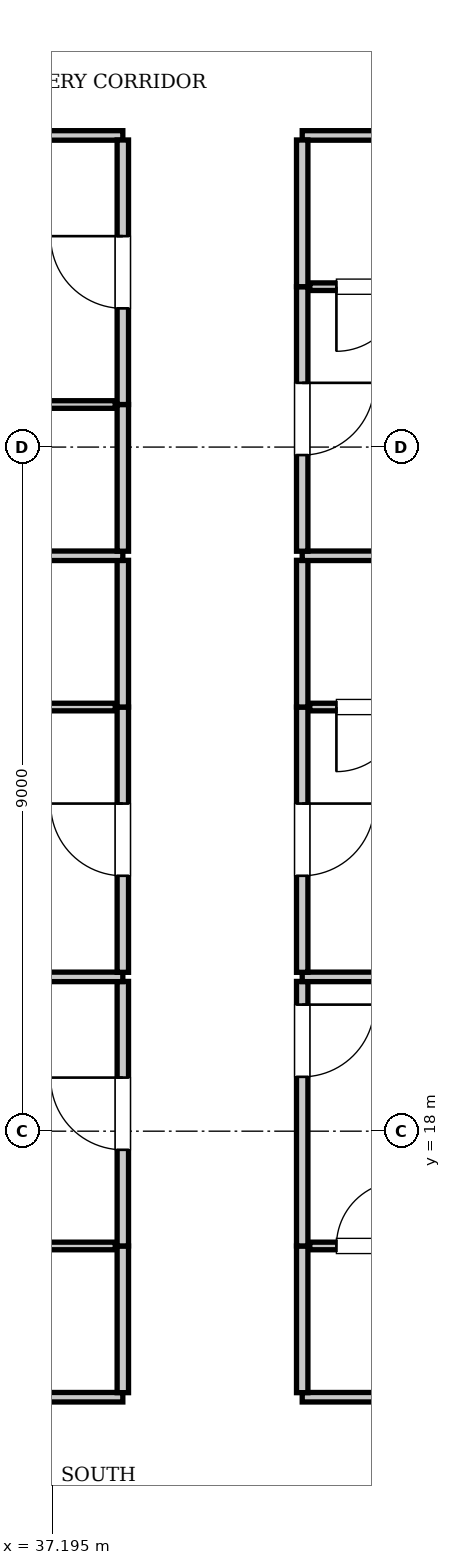
"""IFC4 building model, lengths in metres.
Left out: names, types, materials, properties, quantities, classifications, styles, units other than length and angle.
Written with IfcOpenShell. Run it as: python <this file> out.ifc"""

import sys

from ifc_helpers import new_model, si_unit, direction, frame, frame_2d, origin, place, context, subcontext, project, spatial, rectangle, extrude, element, fill, save


model = new_model("IFC4")
c1 = context("Model", 3, precision=1e-05, world=origin(), true_north=direction((0.0, 1.0)))
c2 = subcontext(c1, "Body", "Model", "MODEL_VIEW")
j1 = project(units=[si_unit("LENGTHUNIT", "METRE"), si_unit("PLANEANGLEUNIT", "RADIAN")], contexts=[c1])
p1 = place(None, origin())
s1 = spatial("IfcSite", under=j1, at=p1, CompositionType="ELEMENT")
p2 = place(p1, origin())
s2 = spatial("IfcBuilding", under=s1, at=p2, CompositionType="ELEMENT")
p3 = place(p2, frame((0.0, 0.0, 158.2)))
s3 = spatial("IfcBuildingStorey", under=s2, at=p3, CompositionType="ELEMENT", Elevation=158.2)
p4 = place(p3, frame((13.2, 14.5, 0.0), z_axis=(0.0, 0.0, 1.0), x_axis=(1.0, 0.0, 0.0)))
e1 = element("IfcWall", 1, at=p4, inside=s3, PredefinedType="PARTITIONING", context=c2, shape_type="SweptSolid", body=[
    extrude(rectangle(XDim=24.92, YDim=0.125, at=frame_2d((12.46, 0.0))), origin(), (0.0, 0.0, 1.0), 3.61),
])
p5 = place(p3, frame((40.48, 14.5, 0.0), z_axis=(0.0, 0.0, 1.0), x_axis=(1.0, 0.0, 0.0)))
e2 = element("IfcWall", 2, at=p5, inside=s3, PredefinedType="PARTITIONING", context=c2, shape_type="SweptSolid", body=[
    extrude(rectangle(XDim=21.92, YDim=0.125, at=frame_2d((10.96, 0.0))), origin(), (0.0, 0.0, 1.0), 3.61),
])
p6 = place(p3, frame((13.2, 31.1, 0.0), z_axis=(0.0, 0.0, 1.0), x_axis=(1.0, 0.0, 0.0)))
e3 = element("IfcWall", 3, at=p6, inside=s3, PredefinedType="PARTITIONING", context=c2, shape_type="SweptSolid", body=[
    extrude(rectangle(XDim=24.92, YDim=0.125, at=frame_2d((12.46, 0.0))), origin(), (0.0, 0.0, 1.0), 3.61),
])
p7 = place(p3, frame((40.48, 31.1, 0.0), z_axis=(0.0, 0.0, 1.0), x_axis=(1.0, 0.0, 0.0)))
e4 = element("IfcWall", 4, at=p7, inside=s3, PredefinedType="PARTITIONING", context=c2, shape_type="SweptSolid", body=[
    extrude(rectangle(XDim=21.92, YDim=0.125, at=frame_2d((10.96, 0.0))), origin(), (0.0, 0.0, 1.0), 3.61),
])
p8 = place(p3, frame((38.12, 14.56, 0.0), z_axis=(0.0, 0.0, 1.0), x_axis=(0.0, 1.0, 0.0)))
e5 = element("IfcWall", 5, at=p8, inside=s3, PredefinedType="PARTITIONING", context=c2, shape_type="SweptSolid", body=[
    extrude(rectangle(XDim=1.93, YDim=0.15, at=frame_2d((0.965, 0.0))), origin(), (0.0, 0.0, 1.0), 3.61),
])
p9 = place(p3, frame((38.12, 16.49, 0.0), z_axis=(0.0, 0.0, 1.0), x_axis=(0.0, 1.0, 0.0)))
e6 = element("IfcWall", 6, at=p9, inside=s3, PredefinedType="PARTITIONING", context=c2, shape_type="SweptSolid", body=[
    extrude(rectangle(XDim=3.48, YDim=0.15, at=frame_2d((1.74, 0.0))), origin(), (0.0, 0.0, 1.0), 3.61),
])
p10 = place(p9, frame((1.265, 0.0, 0.0)))
e7 = element("IfcOpeningElement", 7, at=p10, cuts=e6, PredefinedType="OPENING", context=c2, shape_type="SweptSolid", body=[
    extrude(rectangle(XDim=0.95, YDim=2.15, at=frame_2d((0.475, 1.075))), frame((0.0, 0.085, 0.0), z_axis=(0.0, -1.0, 0.0), x_axis=(1.0, 0.0, 0.0)), (0.0, 0.0, 1.0), 0.17),
])
p11 = place(p3, frame((35.72, 16.49, 0.0), z_axis=(0.0, 0.0, 1.0), x_axis=(1.0, 0.0, 0.0)))
e8 = element("IfcWall", 8, at=p11, inside=s3, PredefinedType="PARTITIONING", context=c2, shape_type="SweptSolid", body=[
    extrude(rectangle(XDim=2.3, YDim=0.1, at=frame_2d((1.15, 0.0))), origin(), (0.0, 0.0, 1.0), 3.61),
])
p12 = place(p11, frame((0.35, 0.0, 0.0)))
e9 = element("IfcOpeningElement", 9, at=p12, cuts=e8, PredefinedType="OPENING", context=c2, shape_type="SweptSolid", body=[
    extrude(rectangle(XDim=0.85, YDim=2.1, at=frame_2d((0.425, 1.05))), frame((0.0, 0.06, 0.0), z_axis=(0.0, -1.0, 0.0), x_axis=(1.0, 0.0, 0.0)), (0.0, 0.0, 1.0), 0.12),
])
p13 = place(p3, frame((40.48, 14.56, 0.0), z_axis=(0.0, 0.0, 1.0), x_axis=(0.0, 1.0, 0.0)))
e10 = element("IfcWall", 10, at=p13, inside=s3, PredefinedType="PARTITIONING", context=c2, shape_type="SweptSolid", body=[
    extrude(rectangle(XDim=1.93, YDim=0.15, at=frame_2d((0.965, 0.0))), origin(), (0.0, 0.0, 1.0), 3.61),
])
p14 = place(p3, frame((40.48, 16.49, 0.0), z_axis=(0.0, 0.0, 1.0), x_axis=(0.0, 1.0, 0.0)))
e11 = element("IfcWall", 11, at=p14, inside=s3, PredefinedType="PARTITIONING", context=c2, shape_type="SweptSolid", body=[
    extrude(rectangle(XDim=3.48, YDim=0.15, at=frame_2d((1.74, 0.0))), origin(), (0.0, 0.0, 1.0), 3.61),
])
p15 = place(p14, frame((2.225, 0.0, 0.0)))
e12 = element("IfcOpeningElement", 12, at=p15, cuts=e11, PredefinedType="OPENING", context=c2, shape_type="SweptSolid", body=[
    extrude(rectangle(XDim=0.95, YDim=2.15, at=frame_2d((0.475, 1.075))), frame((0.0, 0.085, 0.0), z_axis=(0.0, -1.0, 0.0), x_axis=(1.0, 0.0, 0.0)), (0.0, 0.0, 1.0), 0.17),
])
p16 = place(p3, frame((40.58, 16.49, 0.0), z_axis=(0.0, 0.0, 1.0), x_axis=(1.0, 0.0, 0.0)))
e13 = element("IfcWall", 13, at=p16, inside=s3, PredefinedType="PARTITIONING", context=c2, shape_type="SweptSolid", body=[
    extrude(rectangle(XDim=2.3, YDim=0.1, at=frame_2d((1.15, 0.0))), origin(), (0.0, 0.0, 1.0), 3.61),
])
p17 = place(p16, frame((0.35, 0.0, 0.0)))
e14 = element("IfcOpeningElement", 14, at=p17, cuts=e13, PredefinedType="OPENING", context=c2, shape_type="SweptSolid", body=[
    extrude(rectangle(XDim=0.85, YDim=2.1, at=frame_2d((0.425, 1.05))), frame((0.0, 0.06, 0.0), z_axis=(0.0, -1.0, 0.0), x_axis=(1.0, 0.0, 0.0)), (0.0, 0.0, 1.0), 0.12),
])
p18 = place(p3, frame((13.2, 20.03, 0.0), z_axis=(0.0, 0.0, 1.0), x_axis=(1.0, 0.0, 0.0)))
e15 = element("IfcWall", 15, at=p18, inside=s3, PredefinedType="PARTITIONING", context=c2, shape_type="SweptSolid", body=[
    extrude(rectangle(XDim=24.92, YDim=0.125, at=frame_2d((12.46, 0.0))), origin(), (0.0, 0.0, 1.0), 3.61),
])
p19 = place(p3, frame((40.48, 20.03, 0.0), z_axis=(0.0, 0.0, 1.0), x_axis=(1.0, 0.0, 0.0)))
e16 = element("IfcWall", 16, at=p19, inside=s3, PredefinedType="PARTITIONING", context=c2, shape_type="SweptSolid", body=[
    extrude(rectangle(XDim=21.92, YDim=0.125, at=frame_2d((10.96, 0.0))), origin(), (0.0, 0.0, 1.0), 3.61),
])
p20 = place(p3, frame((38.12, 20.09, 0.0), z_axis=(0.0, 0.0, 1.0), x_axis=(0.0, 1.0, 0.0)))
e17 = element("IfcWall", 17, at=p20, inside=s3, PredefinedType="PARTITIONING", context=c2, shape_type="SweptSolid", body=[
    extrude(rectangle(XDim=3.49, YDim=0.15, at=frame_2d((1.745, 0.0))), origin(), (0.0, 0.0, 1.0), 3.61),
])
p21 = place(p20, frame((1.27, 0.0, 0.0)))
e18 = element("IfcOpeningElement", 18, at=p21, cuts=e17, PredefinedType="OPENING", context=c2, shape_type="SweptSolid", body=[
    extrude(rectangle(XDim=0.95, YDim=2.15, at=frame_2d((0.475, 1.075))), frame((0.0, 0.085, 0.0), z_axis=(0.0, -1.0, 0.0), x_axis=(1.0, 0.0, 0.0)), (0.0, 0.0, 1.0), 0.17),
])
p22 = place(p3, frame((38.12, 23.58, 0.0), z_axis=(0.0, 0.0, 1.0), x_axis=(0.0, 1.0, 0.0)))
e19 = element("IfcWall", 19, at=p22, inside=s3, PredefinedType="PARTITIONING", context=c2, shape_type="SweptSolid", body=[
    extrude(rectangle(XDim=1.93, YDim=0.15, at=frame_2d((0.965, 0.0))), origin(), (0.0, 0.0, 1.0), 3.61),
])
p23 = place(p3, frame((35.72, 23.58, 0.0), z_axis=(0.0, 0.0, 1.0), x_axis=(1.0, 0.0, 0.0)))
e20 = element("IfcWall", 20, at=p23, inside=s3, PredefinedType="PARTITIONING", context=c2, shape_type="SweptSolid", body=[
    extrude(rectangle(XDim=2.3, YDim=0.1, at=frame_2d((1.15, 0.0))), origin(), (0.0, 0.0, 1.0), 3.61),
])
p24 = place(p23, frame((0.35, 0.0, 0.0)))
e21 = element("IfcOpeningElement", 21, at=p24, cuts=e20, PredefinedType="OPENING", context=c2, shape_type="SweptSolid", body=[
    extrude(rectangle(XDim=0.85, YDim=2.1, at=frame_2d((0.425, 1.05))), frame((0.0, 0.06, 0.0), z_axis=(0.0, -1.0, 0.0), x_axis=(1.0, 0.0, 0.0)), (0.0, 0.0, 1.0), 0.12),
])
p25 = place(p3, frame((40.48, 20.09, 0.0), z_axis=(0.0, 0.0, 1.0), x_axis=(0.0, 1.0, 0.0)))
e22 = element("IfcWall", 22, at=p25, inside=s3, PredefinedType="PARTITIONING", context=c2, shape_type="SweptSolid", body=[
    extrude(rectangle(XDim=3.49, YDim=0.15, at=frame_2d((1.745, 0.0))), origin(), (0.0, 0.0, 1.0), 3.61),
])
p26 = place(p25, frame((1.27, 0.0, 0.0)))
e23 = element("IfcOpeningElement", 23, at=p26, cuts=e22, PredefinedType="OPENING", context=c2, shape_type="SweptSolid", body=[
    extrude(rectangle(XDim=0.95, YDim=2.15, at=frame_2d((0.475, 1.075))), frame((0.0, 0.085, 0.0), z_axis=(0.0, -1.0, 0.0), x_axis=(1.0, 0.0, 0.0)), (0.0, 0.0, 1.0), 0.17),
])
p27 = place(p3, frame((40.48, 23.58, 0.0), z_axis=(0.0, 0.0, 1.0), x_axis=(0.0, 1.0, 0.0)))
e24 = element("IfcWall", 24, at=p27, inside=s3, PredefinedType="PARTITIONING", context=c2, shape_type="SweptSolid", body=[
    extrude(rectangle(XDim=1.93, YDim=0.15, at=frame_2d((0.965, 0.0))), origin(), (0.0, 0.0, 1.0), 3.61),
])
p28 = place(p3, frame((40.58, 23.58, 0.0), z_axis=(0.0, 0.0, 1.0), x_axis=(1.0, 0.0, 0.0)))
e25 = element("IfcWall", 25, at=p28, inside=s3, PredefinedType="PARTITIONING", context=c2, shape_type="SweptSolid", body=[
    extrude(rectangle(XDim=2.3, YDim=0.1, at=frame_2d((1.15, 0.0))), origin(), (0.0, 0.0, 1.0), 3.61),
])
p29 = place(p28, frame((0.35, 0.0, 0.0)))
e26 = element("IfcOpeningElement", 26, at=p29, cuts=e25, PredefinedType="OPENING", context=c2, shape_type="SweptSolid", body=[
    extrude(rectangle(XDim=0.85, YDim=2.1, at=frame_2d((0.425, 1.05))), frame((0.0, 0.06, 0.0), z_axis=(0.0, -1.0, 0.0), x_axis=(1.0, 0.0, 0.0)), (0.0, 0.0, 1.0), 0.12),
])
p30 = place(p3, frame((13.2, 25.57, 0.0), z_axis=(0.0, 0.0, 1.0), x_axis=(1.0, 0.0, 0.0)))
e27 = element("IfcWall", 27, at=p30, inside=s3, PredefinedType="PARTITIONING", context=c2, shape_type="SweptSolid", body=[
    extrude(rectangle(XDim=24.92, YDim=0.125, at=frame_2d((12.46, 0.0))), origin(), (0.0, 0.0, 1.0), 3.61),
])
p31 = place(p3, frame((40.48, 25.57, 0.0), z_axis=(0.0, 0.0, 1.0), x_axis=(1.0, 0.0, 0.0)))
e28 = element("IfcWall", 28, at=p31, inside=s3, PredefinedType="PARTITIONING", context=c2, shape_type="SweptSolid", body=[
    extrude(rectangle(XDim=21.92, YDim=0.125, at=frame_2d((10.96, 0.0))), origin(), (0.0, 0.0, 1.0), 3.61),
])
p32 = place(p3, frame((38.12, 25.63, 0.0), z_axis=(0.0, 0.0, 1.0), x_axis=(0.0, 1.0, 0.0)))
e29 = element("IfcWall", 29, at=p32, inside=s3, PredefinedType="PARTITIONING", context=c2, shape_type="SweptSolid", body=[
    extrude(rectangle(XDim=1.93, YDim=0.15, at=frame_2d((0.965, 0.0))), origin(), (0.0, 0.0, 1.0), 3.61),
])
p33 = place(p3, frame((38.12, 27.56, 0.0), z_axis=(0.0, 0.0, 1.0), x_axis=(0.0, 1.0, 0.0)))
e30 = element("IfcWall", 30, at=p33, inside=s3, PredefinedType="PARTITIONING", context=c2, shape_type="SweptSolid", body=[
    extrude(rectangle(XDim=3.48, YDim=0.15, at=frame_2d((1.74, 0.0))), origin(), (0.0, 0.0, 1.0), 3.61),
])
p34 = place(p33, frame((1.265, 0.0, 0.0)))
e31 = element("IfcOpeningElement", 31, at=p34, cuts=e30, PredefinedType="OPENING", context=c2, shape_type="SweptSolid", body=[
    extrude(rectangle(XDim=0.95, YDim=2.15, at=frame_2d((0.475, 1.075))), frame((0.0, 0.085, 0.0), z_axis=(0.0, -1.0, 0.0), x_axis=(1.0, 0.0, 0.0)), (0.0, 0.0, 1.0), 0.17),
])
p35 = place(p3, frame((35.72, 27.56, 0.0), z_axis=(0.0, 0.0, 1.0), x_axis=(1.0, 0.0, 0.0)))
e32 = element("IfcWall", 32, at=p35, inside=s3, PredefinedType="PARTITIONING", context=c2, shape_type="SweptSolid", body=[
    extrude(rectangle(XDim=2.3, YDim=0.1, at=frame_2d((1.15, 0.0))), origin(), (0.0, 0.0, 1.0), 3.61),
])
p36 = place(p35, frame((0.35, 0.0, 0.0)))
e33 = element("IfcOpeningElement", 33, at=p36, cuts=e32, PredefinedType="OPENING", context=c2, shape_type="SweptSolid", body=[
    extrude(rectangle(XDim=0.85, YDim=2.1, at=frame_2d((0.425, 1.05))), frame((0.0, 0.06, 0.0), z_axis=(0.0, -1.0, 0.0), x_axis=(1.0, 0.0, 0.0)), (0.0, 0.0, 1.0), 0.12),
])
p37 = place(p3, frame((40.48, 25.63, 0.0), z_axis=(0.0, 0.0, 1.0), x_axis=(0.0, 1.0, 0.0)))
e34 = element("IfcWall", 34, at=p37, inside=s3, PredefinedType="PARTITIONING", context=c2, shape_type="SweptSolid", body=[
    extrude(rectangle(XDim=3.48, YDim=0.15, at=frame_2d((1.74, 0.0))), origin(), (0.0, 0.0, 1.0), 3.61),
])
p38 = place(p37, frame((1.265, 0.0, 0.0)))
e35 = element("IfcOpeningElement", 35, at=p38, cuts=e34, PredefinedType="OPENING", context=c2, shape_type="SweptSolid", body=[
    extrude(rectangle(XDim=0.95, YDim=2.15, at=frame_2d((0.475, 1.075))), frame((0.0, 0.085, 0.0), z_axis=(0.0, -1.0, 0.0), x_axis=(1.0, 0.0, 0.0)), (0.0, 0.0, 1.0), 0.17),
])
p39 = place(p3, frame((40.48, 29.11, 0.0), z_axis=(0.0, 0.0, 1.0), x_axis=(0.0, 1.0, 0.0)))
e36 = element("IfcWall", 36, at=p39, inside=s3, PredefinedType="PARTITIONING", context=c2, shape_type="SweptSolid", body=[
    extrude(rectangle(XDim=1.93, YDim=0.15, at=frame_2d((0.965, 0.0))), origin(), (0.0, 0.0, 1.0), 3.61),
])
p40 = place(p3, frame((40.58, 29.11, 0.0), z_axis=(0.0, 0.0, 1.0), x_axis=(1.0, 0.0, 0.0)))
e37 = element("IfcWall", 37, at=p40, inside=s3, PredefinedType="PARTITIONING", context=c2, shape_type="SweptSolid", body=[
    extrude(rectangle(XDim=2.3, YDim=0.1, at=frame_2d((1.15, 0.0))), origin(), (0.0, 0.0, 1.0), 3.61),
])
p41 = place(p40, frame((0.35, 0.0, 0.0)))
e38 = element("IfcOpeningElement", 38, at=p41, cuts=e37, PredefinedType="OPENING", context=c2, shape_type="SweptSolid", body=[
    extrude(rectangle(XDim=0.85, YDim=2.1, at=frame_2d((0.425, 1.05))), frame((0.0, 0.06, 0.0), z_axis=(0.0, -1.0, 0.0), x_axis=(1.0, 0.0, 0.0)), (0.0, 0.0, 1.0), 0.12),
])
p42 = place(p10, origin())
e39 = element("IfcDoor", 39, at=p42, inside=s3, OperationType="SINGLE_SWING_RIGHT", PredefinedType="DOOR", context=c2, shape_type="SweptSolid", body=[
    extrude(rectangle(XDim=0.95, YDim=2.15, at=frame_2d((0.475, 1.075))), frame((0.0, 0.025, 0.0), z_axis=(0.0, -1.0, 0.0), x_axis=(1.0, 0.0, 0.0)), (0.0, 0.0, 1.0), 0.05),
])
fill(e7, e39)
p43 = place(p17, origin())
e40 = element("IfcDoor", 40, at=p43, inside=s3, OperationType="SINGLE_SWING_RIGHT", PredefinedType="DOOR", context=c2, shape_type="SweptSolid", body=[
    extrude(rectangle(XDim=0.85, YDim=2.1, at=frame_2d((0.425, 1.05))), frame((0.0, 0.025, 0.0), z_axis=(0.0, -1.0, 0.0), x_axis=(1.0, 0.0, 0.0)), (0.0, 0.0, 1.0), 0.05),
])
fill(e14, e40)
p44 = place(p15, frame((0.95, 0.0, 0.0), z_axis=(0.0, 0.0, 1.0), x_axis=(-1.0, 0.0, 0.0)))
e41 = element("IfcDoor", 41, at=p44, inside=s3, OperationType="SINGLE_SWING_LEFT", PredefinedType="DOOR", context=c2, shape_type="SweptSolid", body=[
    extrude(rectangle(XDim=0.95, YDim=2.15, at=frame_2d((0.475, 1.075))), frame((0.0, 0.025, 0.0), z_axis=(0.0, -1.0, 0.0), x_axis=(1.0, 0.0, 0.0)), (0.0, 0.0, 1.0), 0.05),
])
fill(e12, e41)
p45 = place(p21, origin())
e42 = element("IfcDoor", 42, at=p45, inside=s3, OperationType="SINGLE_SWING_RIGHT", PredefinedType="DOOR", context=c2, shape_type="SweptSolid", body=[
    extrude(rectangle(XDim=0.95, YDim=2.15, at=frame_2d((0.475, 1.075))), frame((0.0, 0.025, 0.0), z_axis=(0.0, -1.0, 0.0), x_axis=(1.0, 0.0, 0.0)), (0.0, 0.0, 1.0), 0.05),
])
fill(e18, e42)
p46 = place(p29, frame((0.85, 0.0, 0.0), z_axis=(0.0, 0.0, 1.0), x_axis=(-1.0, 0.0, 0.0)))
e43 = element("IfcDoor", 43, at=p46, inside=s3, OperationType="SINGLE_SWING_RIGHT", PredefinedType="DOOR", context=c2, shape_type="SweptSolid", body=[
    extrude(rectangle(XDim=0.85, YDim=2.1, at=frame_2d((0.425, 1.05))), frame((0.0, 0.025, 0.0), z_axis=(0.0, -1.0, 0.0), x_axis=(1.0, 0.0, 0.0)), (0.0, 0.0, 1.0), 0.05),
])
fill(e26, e43)
p47 = place(p26, frame((0.95, 0.0, 0.0), z_axis=(0.0, 0.0, 1.0), x_axis=(-1.0, 0.0, 0.0)))
e44 = element("IfcDoor", 44, at=p47, inside=s3, OperationType="SINGLE_SWING_LEFT", PredefinedType="DOOR", context=c2, shape_type="SweptSolid", body=[
    extrude(rectangle(XDim=0.95, YDim=2.15, at=frame_2d((0.475, 1.075))), frame((0.0, 0.025, 0.0), z_axis=(0.0, -1.0, 0.0), x_axis=(1.0, 0.0, 0.0)), (0.0, 0.0, 1.0), 0.05),
])
fill(e23, e44)
p48 = place(p34, origin())
e45 = element("IfcDoor", 45, at=p48, inside=s3, OperationType="SINGLE_SWING_RIGHT", PredefinedType="DOOR", context=c2, shape_type="SweptSolid", body=[
    extrude(rectangle(XDim=0.95, YDim=2.15, at=frame_2d((0.475, 1.075))), frame((0.0, 0.025, 0.0), z_axis=(0.0, -1.0, 0.0), x_axis=(1.0, 0.0, 0.0)), (0.0, 0.0, 1.0), 0.05),
])
fill(e31, e45)
p49 = place(p41, frame((0.85, 0.0, 0.0), z_axis=(0.0, 0.0, 1.0), x_axis=(-1.0, 0.0, 0.0)))
e46 = element("IfcDoor", 46, at=p49, inside=s3, OperationType="SINGLE_SWING_RIGHT", PredefinedType="DOOR", context=c2, shape_type="SweptSolid", body=[
    extrude(rectangle(XDim=0.85, YDim=2.1, at=frame_2d((0.425, 1.05))), frame((0.0, 0.025, 0.0), z_axis=(0.0, -1.0, 0.0), x_axis=(1.0, 0.0, 0.0)), (0.0, 0.0, 1.0), 0.05),
])
fill(e38, e46)
p50 = place(p38, frame((0.95, 0.0, 0.0), z_axis=(0.0, 0.0, 1.0), x_axis=(-1.0, 0.0, 0.0)))
e47 = element("IfcDoor", 47, at=p50, inside=s3, OperationType="SINGLE_SWING_LEFT", PredefinedType="DOOR", context=c2, shape_type="SweptSolid", body=[
    extrude(rectangle(XDim=0.95, YDim=2.15, at=frame_2d((0.475, 1.075))), frame((0.0, 0.025, 0.0), z_axis=(0.0, -1.0, 0.0), x_axis=(1.0, 0.0, 0.0)), (0.0, 0.0, 1.0), 0.05),
])
fill(e35, e47)
save(model, sys.argv[1])
